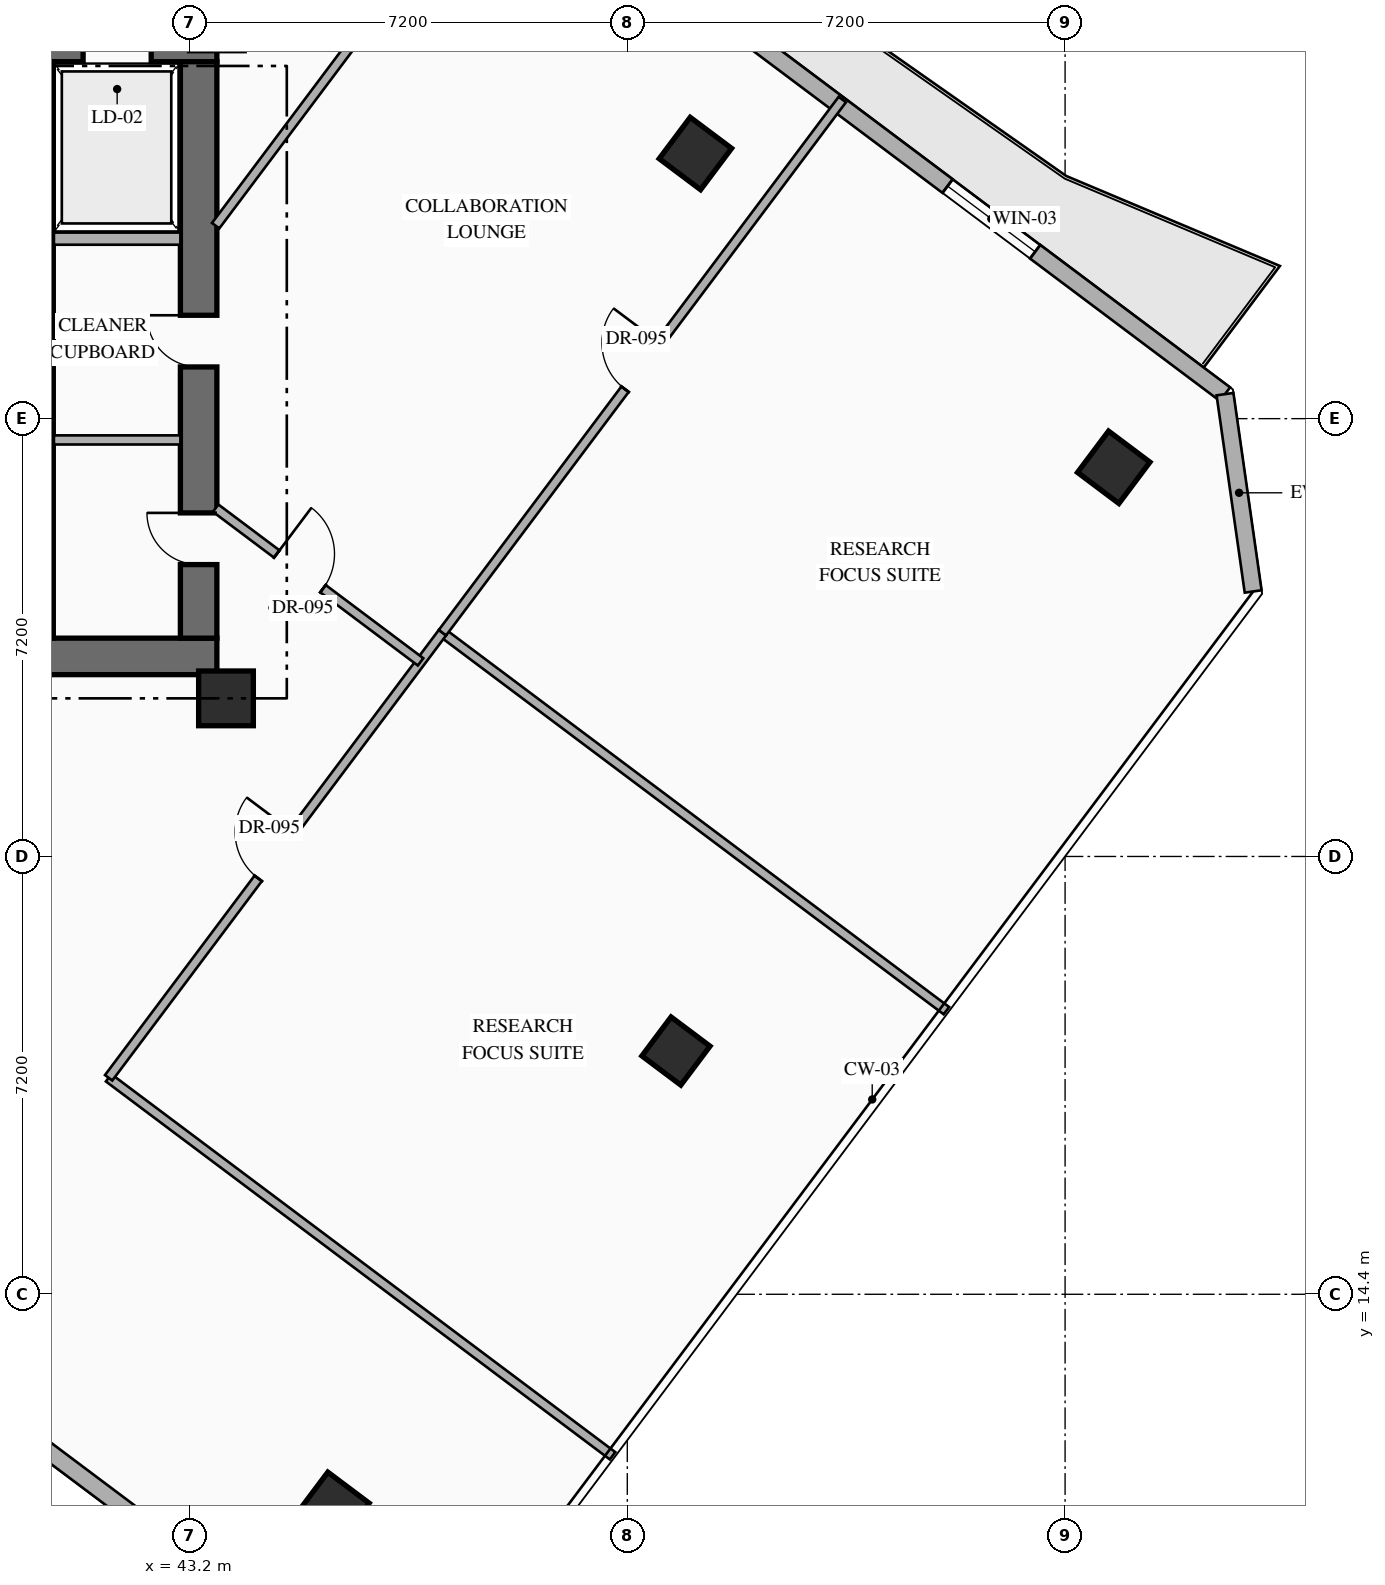
"""IFC4 building model, lengths in metres.
Left out: names, types, materials, properties, quantities, classifications, styles, units other than length and angle.
Written with IfcOpenShell. Run it as: python <this file> out.ifc"""

import sys

from ifc_helpers import new_model, si_unit, direction, frame, frame_2d, origin, origin_2d, place, context, subcontext, project, spatial, rectangle, hollow_rectangle, extrude, element, fill, save


model = new_model("IFC4")
c1 = context("Model", 3, precision=1e-05, world=origin(), true_north=direction((0.0, 1.0)))
c2 = subcontext(c1, "Body", "Model", "MODEL_VIEW")
j1 = project(units=[si_unit("LENGTHUNIT", "METRE"), si_unit("PLANEANGLEUNIT", "RADIAN")], contexts=[c1])
p1 = place(None, origin())
s1 = spatial("IfcSite", under=j1, at=p1, CompositionType="ELEMENT")
p2 = place(p1, origin())
s2 = spatial("IfcBuilding", under=s1, at=p2, CompositionType="ELEMENT")
p3 = place(p2, frame((0.0, 0.0, 156.45)))
s3 = spatial("IfcBuildingStorey", under=s2, at=p3, CompositionType="ELEMENT", Elevation=156.45)
p4 = place(p3, frame((35.89, 24.89, 0.0), z_axis=(0.0, 0.0, 1.0), x_axis=(1.0, 0.0, 0.0)))
e1 = element("IfcWall", 1, at=p4, inside=s3, PredefinedType="SHEAR", context=c2, shape_type="SweptSolid", body=[
    extrude(rectangle(XDim=7.76, YDim=0.6, at=frame_2d((3.88, 0.0))), origin(), (0.0, 0.0, 1.0), 3.6),
])
p5 = place(p3, frame((35.89, 34.97, 0.0), z_axis=(0.0, 0.0, 1.0), x_axis=(1.0, 0.0, 0.0)))
e2 = element("IfcWall", 2, at=p5, inside=s3, PredefinedType="SHEAR", context=c2, shape_type="SweptSolid", body=[
    extrude(rectangle(XDim=7.76, YDim=0.6, at=frame_2d((3.88, 0.0))), origin(), (0.0, 0.0, 1.0), 3.6),
])
p6 = place(p5, frame((2.66, 0.0, 0.0)))
e3 = element("IfcOpeningElement", 3, at=p6, cuts=e2, PredefinedType="OPENING", context=c2, shape_type="SweptSolid", body=[
    extrude(rectangle(XDim=1.1, YDim=2.2, at=frame_2d((0.55, 1.1))), frame((0.0, 0.31, 0.0), z_axis=(0.0, -1.0, 0.0), x_axis=(1.0, 0.0, 0.0)), (0.0, 0.0, 1.0), 0.62),
])
p7 = place(p5, frame((5.56, 0.0, 0.0)))
e4 = element("IfcOpeningElement", 4, at=p7, cuts=e2, PredefinedType="OPENING", context=c2, shape_type="SweptSolid", body=[
    extrude(rectangle(XDim=1.12, YDim=2.15, at=frame_2d((0.56, 1.075))), frame((0.0, 0.31, 0.0), z_axis=(0.0, -1.0, 0.0), x_axis=(1.0, 0.0, 0.0)), (0.0, 0.0, 1.0), 0.62),
])
p8 = place(p3, frame((43.35, 25.19, 0.0), z_axis=(0.0, 0.0, 1.0), x_axis=(0.0, 1.0, 0.0)))
e5 = element("IfcWall", 5, at=p8, inside=s3, PredefinedType="SHEAR", context=c2, shape_type="SweptSolid", body=[
    extrude(rectangle(XDim=9.48, YDim=0.6, at=frame_2d((4.74, 0.0))), origin(), (0.0, 0.0, 1.0), 3.6),
])
p9 = place(p8, frame((1.21, 0.0, 0.0)))
e6 = element("IfcOpeningElement", 6, at=p9, cuts=e5, PredefinedType="OPENING", context=c2, shape_type="SweptSolid", body=[
    extrude(rectangle(XDim=0.85, YDim=2.08, at=frame_2d((0.425, 1.04))), frame((0.0, 0.31, 0.0), z_axis=(0.0, -1.0, 0.0), x_axis=(1.0, 0.0, 0.0)), (0.0, 0.0, 1.0), 0.62),
])
p10 = place(p8, frame((4.46, 0.0, 0.0)))
e7 = element("IfcOpeningElement", 7, at=p10, cuts=e5, PredefinedType="OPENING", context=c2, shape_type="SweptSolid", body=[
    extrude(rectangle(XDim=0.85, YDim=2.08, at=frame_2d((0.425, 1.04))), frame((0.0, 0.31, 0.0), z_axis=(0.0, -1.0, 0.0), x_axis=(1.0, 0.0, 0.0)), (0.0, 0.0, 1.0), 0.62),
])
p11 = place(p3, frame((40.81, 25.19, 0.0), z_axis=(0.0, 0.0, 1.0), x_axis=(0.0, 1.0, 0.0)))
e8 = element("IfcWall", 8, at=p11, inside=s3, PredefinedType="SHEAR", context=c2, shape_type="SweptSolid", body=[
    extrude(rectangle(XDim=9.48, YDim=0.3, at=frame_2d((4.74, 0.0))), origin(), (0.0, 0.0, 1.0), 3.6),
])
p12 = place(p3, frame((43.8, 24.2, 0.0), z_axis=(0.0, 0.0, 1.0), x_axis=(1.0, 0.0, 0.0)))
e9 = element("IfcColumn", 9, at=p12, inside=s3, PredefinedType="COLUMN", context=c2, shape_type="SweptSolid", body=[
    extrude(rectangle(XDim=0.9, YDim=0.9, at=origin_2d()), origin(), (0.0, 0.0, 1.0), 3.6),
])
for number, where, z_axis, x_axis in (
    (10, (51.52, 33.16, 0.0), (0.0, 0.0, 1.0), (0.8, -0.6, 0.0)),
    (11, (45.56, 10.88, 0.0), (0.0, 0.0, 1.0), (0.8, -0.6, 0.0)),
    (12, (58.4, 28.0, 0.0), (0.0, 0.0, 1.0), (0.8, -0.6, 0.0)),
):
    element("IfcColumn", number, at=place(p3, frame(where, z_axis=z_axis, x_axis=x_axis)), inside=s3, PredefinedType="COLUMN", context=c2, shape_type="SweptSolid", body=[
        extrude(hollow_rectangle(XDim=0.85, YDim=0.85, WallThickness=0.032, at=origin_2d()), origin(), (0.0, 0.0, 1.0), 3.6),
    ])
p13 = place(p3, frame((51.2, 18.4, 0.0), z_axis=(0.0, 0.0, 1.0), x_axis=(0.799999996291, -0.600000004945, 0.0)))
e13 = element("IfcColumn", 13, at=p13, inside=s3, PredefinedType="COLUMN", context=c2, shape_type="SweptSolid", body=[
    extrude(hollow_rectangle(XDim=0.8, YDim=0.8, WallThickness=0.032, at=origin_2d()), origin(), (0.0, 0.0, 1.0), 3.6),
])
p14 = place(p3, frame((44.86, 40.73, 0.0), z_axis=(0.0, 0.0, 1.0), x_axis=(0.800007624502, -0.599989833863, 0.0)))
e14 = element("IfcWall", 14, at=p14, inside=s3, PredefinedType="STANDARD", context=c2, shape_type="SweptSolid", body=[
    extrude(rectangle(XDim=19.212, YDim=0.28, at=frame_2d((9.606, 0.0))), origin(), (0.0, 0.0, 1.0), 3.35),
])
p15 = place(p14, frame((1.755, 0.0, 0.0)))
e15 = element("IfcOpeningElement", 15, at=p15, cuts=e14, PredefinedType="OPENING", context=c2, shape_type="SweptSolid", body=[
    extrude(rectangle(XDim=1.1, YDim=2.2, at=frame_2d((0.55, 1.1))), frame((0.0, 0.15, 0.0), z_axis=(0.0, -1.0, 0.0), x_axis=(1.0, 0.0, 0.0)), (0.0, 0.0, 1.0), 0.3),
])
p16 = place(p14, frame((13.509, 0.0, 0.85)))
e16 = element("IfcOpeningElement", 16, at=p16, cuts=e14, PredefinedType="OPENING", context=c2, shape_type="SweptSolid", body=[
    extrude(rectangle(XDim=1.8, YDim=2.1, at=frame_2d((0.9, 1.05))), frame((0.0, 0.15, 0.0), z_axis=(0.0, -1.0, 0.0), x_axis=(1.0, 0.0, 0.0)), (0.0, 0.0, 1.0), 0.3),
])
p17 = place(p3, frame((60.23, 29.203, 0.0), z_axis=(0.0, 0.0, 1.0), x_axis=(0.141296221922, -0.989967361922, 0.0)))
e17 = element("IfcWall", 17, at=p17, inside=s3, PredefinedType="STANDARD", context=c2, shape_type="SweptSolid", body=[
    extrude(rectangle(XDim=3.278, YDim=0.28, at=frame_2d((1.639, 0.0))), origin(), (0.0, 0.0, 1.0), 3.35),
])
p18 = place(p3, frame((44.918, 8.787, 0.0), z_axis=(0.0, 0.0, 1.0), x_axis=(-0.800004765927, 0.599993645378, 0.0)))
e18 = element("IfcWall", 18, at=p18, inside=s3, PredefinedType="STANDARD", context=c2, shape_type="SweptSolid", body=[
    extrude(rectangle(XDim=24.588, YDim=0.28, at=frame_2d((12.294, 0.0))), origin(), (0.0, 0.0, 1.0), 3.35),
])
p19 = place(p3, frame((40.97, 31.76, 0.0), z_axis=(0.0, 0.0, 1.0), x_axis=(1.0, 0.0, 0.0)))
e19 = element("IfcWall", 19, at=p19, inside=s3, PredefinedType="STANDARD", context=c2, shape_type="SweptSolid", body=[
    extrude(rectangle(XDim=2.08, YDim=0.2, at=frame_2d((1.04, 0.0))), origin(), (0.0, 0.0, 1.0), 3.35),
])
p20 = place(p3, frame((40.97, 28.45, 0.0), z_axis=(0.0, 0.0, 1.0), x_axis=(1.0, 0.0, 0.0)))
e20 = element("IfcWall", 20, at=p20, inside=s3, PredefinedType="PARTITIONING", context=c2, shape_type="SweptSolid", body=[
    extrude(rectangle(XDim=2.08, YDim=0.15, at=frame_2d((1.04, 0.0))), origin(), (0.0, 0.0, 1.0), 3.35),
])
for number, where, z_axis, x_axis in (
    (21, (41.87, 17.96, 0.0), (0.0, 0.0, 1.0), (0.8, -0.6, 0.0)),
    (22, (47.36, 25.28, 0.0), (0.0, 0.0, 1.0), (0.8, -0.6, 0.0)),
):
    element("IfcWall", number, at=place(p3, frame(where, z_axis=z_axis, x_axis=x_axis)), inside=s3, PredefinedType="PARTITIONING", context=c2, shape_type="SweptSolid", body=[
        extrude(rectangle(XDim=10.36, YDim=0.15, at=frame_2d((5.18, 0.0))), origin(), (0.0, 0.0, 1.0), 3.35),
    ])
p21 = place(p3, frame((41.87, 17.96, 0.0), z_axis=(0.0, 0.0, 1.0), x_axis=(0.599995730889, 0.800003201816, 0.0)))
e23 = element("IfcWall", 23, at=p21, inside=s3, PredefinedType="PARTITIONING", context=c2, shape_type="SweptSolid", body=[
    extrude(rectangle(XDim=9.15, YDim=0.15, at=frame_2d((4.575, 0.0))), origin(), (0.0, 0.0, 1.0), 3.35),
])
p22 = place(p21, frame((4.1, 0.0, 0.0)))
e24 = element("IfcOpeningElement", 24, at=p22, cuts=e23, PredefinedType="OPENING", context=c2, shape_type="SweptSolid", body=[
    extrude(rectangle(XDim=0.95, YDim=2.15, at=frame_2d((0.475, 1.075))), frame((0.0, 0.085, 0.0), z_axis=(0.0, -1.0, 0.0), x_axis=(1.0, 0.0, 0.0)), (0.0, 0.0, 1.0), 0.17),
])
p23 = place(p3, frame((47.36, 25.28, 0.0), z_axis=(0.0, 0.0, 1.0), x_axis=(0.599992871789, 0.800005346109, 0.0)))
e25 = element("IfcWall", 25, at=p23, inside=s3, PredefinedType="PARTITIONING", context=c2, shape_type="SweptSolid", body=[
    extrude(rectangle(XDim=10.96, YDim=0.15, at=frame_2d((5.48, 0.0))), origin(), (0.0, 0.0, 1.0), 3.35),
])
p24 = place(p23, frame((5.005, 0.0, 0.0)))
e26 = element("IfcOpeningElement", 26, at=p24, cuts=e25, PredefinedType="OPENING", context=c2, shape_type="SweptSolid", body=[
    extrude(rectangle(XDim=0.95, YDim=2.15, at=frame_2d((0.475, 1.075))), frame((0.0, 0.085, 0.0), z_axis=(0.0, -1.0, 0.0), x_axis=(1.0, 0.0, 0.0)), (0.0, 0.0, 1.0), 0.17),
])
p25 = place(p3, frame((43.63, 27.328, 0.0), z_axis=(0.0, 0.0, 1.0), x_axis=(0.799972182084, -0.600037088764, 0.0)))
e27 = element("IfcWall", 27, at=p25, inside=s3, PredefinedType="PARTITIONING", context=c2, shape_type="SweptSolid", body=[
    extrude(rectangle(XDim=4.213, YDim=0.15, at=frame_2d((2.106, 0.0))), origin(), (0.0, 0.0, 1.0), 3.045),
])
p26 = place(p25, frame((1.256, 0.0, 0.0)))
e28 = element("IfcOpeningElement", 28, at=p26, cuts=e27, PredefinedType="OPENING", context=c2, shape_type="SweptSolid", body=[
    extrude(rectangle(XDim=0.95, YDim=2.15, at=frame_2d((0.475, 1.075))), frame((0.0, 0.085, 0.0), z_axis=(0.0, -1.0, 0.0), x_axis=(1.0, 0.0, 0.0)), (0.0, 0.0, 1.0), 0.17),
])
p27 = place(p3, frame((43.63, 31.973, 0.0), z_axis=(0.0, 0.0, 1.0), x_axis=(0.599975099311, 0.800018674911, 0.0)))
e29 = element("IfcWall", 29, at=p27, inside=s3, PredefinedType="PARTITIONING", context=c2, shape_type="SweptSolid", body=[
    extrude(rectangle(XDim=7.844, YDim=0.15, at=frame_2d((3.922, 0.0))), origin(), (0.0, 0.0, 1.0), 3.35),
])
p28 = place(p16, origin())
e30 = element("IfcWindow", 30, at=p28, inside=s3, PartitioningType="SINGLE_PANEL", PredefinedType="WINDOW", context=c2, shape_type="SweptSolid", body=[
    extrude(rectangle(XDim=1.8, YDim=2.1, at=frame_2d((0.9, 1.05))), frame((0.0, 0.03, 0.0), z_axis=(0.0, -1.0, 0.0), x_axis=(1.0, 0.0, 0.0)), (0.0, 0.0, 1.0), 0.06),
])
fill(e16, e30)
p29 = place(p9, origin())
e31 = element("IfcDoor", 31, at=p29, inside=s3, OperationType="SINGLE_SWING_RIGHT", PredefinedType="DOOR", context=c2, shape_type="SweptSolid", body=[
    extrude(rectangle(XDim=0.85, YDim=2.08, at=frame_2d((0.425, 1.04))), frame((0.0, 0.025, 0.0), z_axis=(0.0, -1.0, 0.0), x_axis=(1.0, 0.0, 0.0)), (0.0, 0.0, 1.0), 0.05),
])
fill(e6, e31)
p30 = place(p10, origin())
e32 = element("IfcDoor", 32, at=p30, inside=s3, OperationType="SINGLE_SWING_RIGHT", PredefinedType="DOOR", context=c2, shape_type="SweptSolid", body=[
    extrude(rectangle(XDim=0.85, YDim=2.08, at=frame_2d((0.425, 1.04))), frame((0.0, 0.025, 0.0), z_axis=(0.0, -1.0, 0.0), x_axis=(1.0, 0.0, 0.0)), (0.0, 0.0, 1.0), 0.05),
])
fill(e7, e32)
p31 = place(p22, origin())
e33 = element("IfcDoor", 33, at=p31, inside=s3, OperationType="SINGLE_SWING_RIGHT", PredefinedType="DOOR", context=c2, shape_type="SweptSolid", body=[
    extrude(rectangle(XDim=0.95, YDim=2.15, at=frame_2d((0.475, 1.075))), frame((0.0, 0.025, 0.0), z_axis=(0.0, -1.0, 0.0), x_axis=(1.0, 0.0, 0.0)), (0.0, 0.0, 1.0), 0.05),
])
fill(e24, e33)
p32 = place(p24, origin())
e34 = element("IfcDoor", 34, at=p32, inside=s3, OperationType="SINGLE_SWING_RIGHT", PredefinedType="DOOR", context=c2, shape_type="SweptSolid", body=[
    extrude(rectangle(XDim=0.95, YDim=2.15, at=frame_2d((0.475, 1.075))), frame((0.0, 0.025, 0.0), z_axis=(0.0, -1.0, 0.0), x_axis=(1.0, 0.0, 0.0)), (0.0, 0.0, 1.0), 0.05),
])
fill(e26, e34)
p33 = place(p26, origin())
e35 = element("IfcDoor", 35, at=p33, inside=s3, OperationType="SINGLE_SWING_LEFT", PredefinedType="DOOR", context=c2, shape_type="SweptSolid", body=[
    extrude(rectangle(XDim=0.95, YDim=2.15, at=frame_2d((0.475, 1.075))), frame((0.0, 0.025, 0.0), z_axis=(0.0, -1.0, 0.0), x_axis=(1.0, 0.0, 0.0)), (0.0, 0.0, 1.0), 0.05),
])
fill(e28, e35)
save(model, sys.argv[1])
